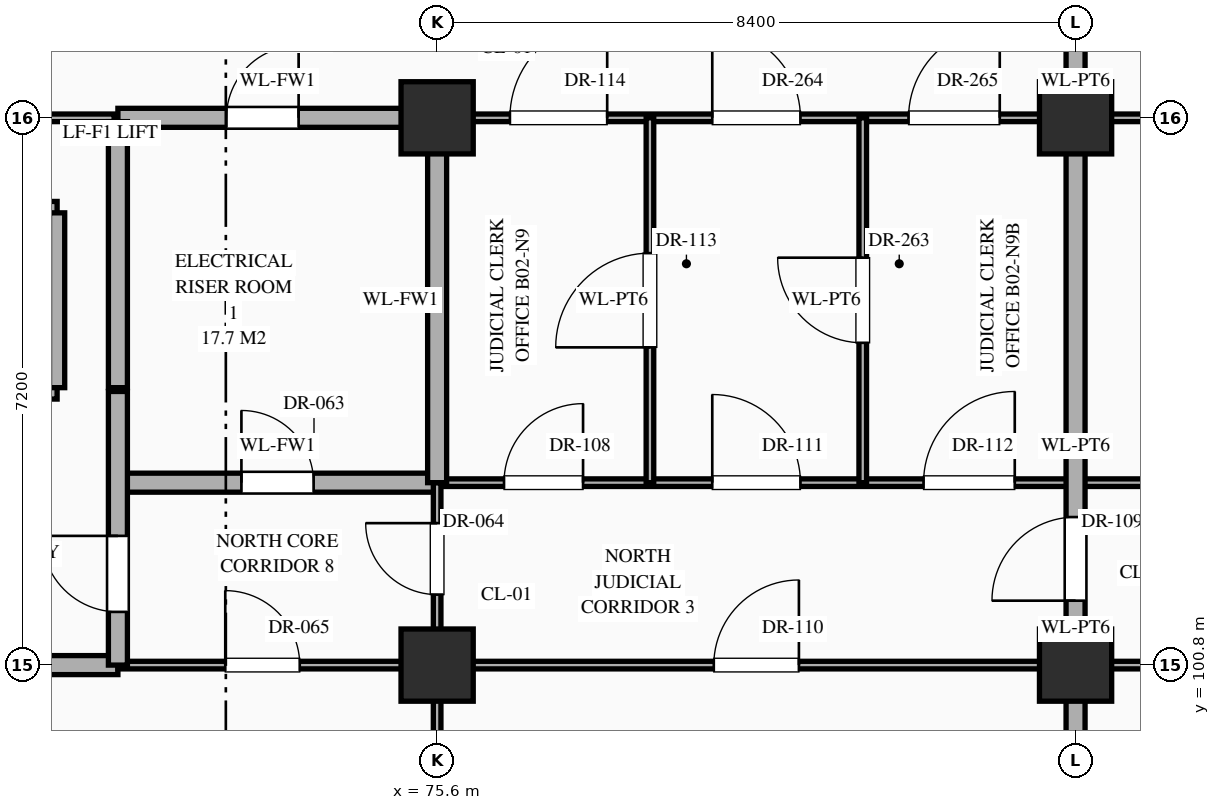
"""IFC4 building model, lengths in metres.
Left out: names, types, materials, properties, quantities, classifications, styles, units other than length and angle.
Written with IfcOpenShell. Run it as: python <this file> out.ifc"""

import sys

from ifc_helpers import new_model, si_unit, direction, frame, frame_2d, origin, origin_2d, place, context, subcontext, project, spatial, rectangle, extrude, element, fill, save


model = new_model("IFC4")
c1 = context("Model", 3, precision=1e-05, world=origin(), true_north=direction((0.0, 1.0)))
c2 = subcontext(c1, "Body", "Model", "MODEL_VIEW")
j1 = project(units=[si_unit("LENGTHUNIT", "METRE"), si_unit("PLANEANGLEUNIT", "RADIAN")], contexts=[c1])
p1 = place(None, origin())
s1 = spatial("IfcSite", under=j1, at=p1, CompositionType="ELEMENT")
p2 = place(p1, origin())
s2 = spatial("IfcBuilding", under=s1, at=p2, CompositionType="ELEMENT")
p3 = place(p2, frame((0.0, 0.0, -10.2)))
s3 = spatial("IfcBuildingStorey", under=s2, at=p3, CompositionType="ELEMENT", Elevation=-10.2)
for number, where, z_axis, x_axis in (
    (1, (75.6, 100.8, 0.0), (0.0, 0.0, 1.0), (1.0, 0.0, 0.0)),
    (2, (75.6, 108.0, 0.0), (0.0, 0.0, 1.0), (1.0, 0.0, 0.0)),
    (3, (84.0, 100.8, 0.0), (0.0, 0.0, 1.0), (1.0, 0.0, 0.0)),
    (4, (84.0, 108.0, 0.0), (0.0, 0.0, 1.0), (1.0, 0.0, 0.0)),
):
    element("IfcColumn", number, at=place(p3, frame(where, z_axis=z_axis, x_axis=x_axis)), inside=s3, PredefinedType="COLUMN", context=c2, shape_type="SweptSolid", body=[
        extrude(rectangle(XDim=0.95, YDim=0.95, at=origin_2d()), origin(), (0.0, 0.0, 1.0), 4.8),
    ])
p4 = place(p3, frame((58.8, 100.8, 0.0), z_axis=(0.0, 0.0, 1.0), x_axis=(1.0, 0.0, 0.0)))
e5 = element("IfcWall", 5, at=p4, inside=s3, PredefinedType="STANDARD", context=c2, shape_type="SweptSolid", body=[
    extrude(rectangle(XDim=12.6, YDim=0.25, at=frame_2d((6.3, 0.0))), origin(), (0.0, 0.0, 1.0), 3.63),
])
p5 = place(p4, frame((3.7, 0.0, 0.0)))
e6 = element("IfcOpeningElement", 6, at=p5, cuts=e5, PredefinedType="OPENING", context=c2, shape_type="SweptSolid", body=[
    extrude(rectangle(XDim=1.0, YDim=2.2, at=frame_2d((0.5, 1.1))), frame((0.0, 0.137, 0.0), z_axis=(0.0, -1.0, 0.0), x_axis=(1.0, 0.0, 0.0)), (0.0, 0.0, 1.0), 0.274),
])
p6 = place(p3, frame((71.4, 100.8, 0.0), z_axis=(0.0, 0.0, 1.0), x_axis=(1.0, 0.0, 0.0)))
e7 = element("IfcWall", 7, at=p6, inside=s3, PredefinedType="STANDARD", context=c2, shape_type="SweptSolid", body=[
    extrude(rectangle(XDim=25.2, YDim=0.1, at=frame_2d((12.6, 0.0))), origin(), (0.0, 0.0, 1.0), 3.63),
])
p7 = place(p6, frame((1.413, 0.0, 0.0)))
e8 = element("IfcOpeningElement", 8, at=p7, cuts=e7, PredefinedType="OPENING", context=c2, shape_type="SweptSolid", body=[
    extrude(rectangle(XDim=0.98, YDim=2.35, at=frame_2d((0.49, 1.175))), frame((0.0, 0.062, 0.0), z_axis=(0.0, -1.0, 0.0), x_axis=(1.0, 0.0, 0.0)), (0.0, 0.0, 1.0), 0.124),
])
p8 = place(p6, frame((22.867, 0.0, 0.0)))
e9 = element("IfcOpeningElement", 9, at=p8, cuts=e7, PredefinedType="OPENING", context=c2, shape_type="SweptSolid", body=[
    extrude(rectangle(XDim=0.86, YDim=2.1, at=frame_2d((0.43, 1.05))), frame((0.0, 0.062, 0.0), z_axis=(0.0, -1.0, 0.0), x_axis=(1.0, 0.0, 0.0)), (0.0, 0.0, 1.0), 0.124),
])
p9 = place(p6, frame((7.84, 0.0, 0.0)))
e10 = element("IfcOpeningElement", 10, at=p9, cuts=e7, PredefinedType="OPENING", context=c2, shape_type="SweptSolid", body=[
    extrude(rectangle(XDim=1.12, YDim=2.25, at=frame_2d((0.56, 1.125))), frame((0.0, 0.062, 0.0), z_axis=(0.0, -1.0, 0.0), x_axis=(1.0, 0.0, 0.0)), (0.0, 0.0, 1.0), 0.124),
])
p10 = place(p6, frame((14.008, 0.0, 0.0)))
e11 = element("IfcOpeningElement", 11, at=p10, cuts=e7, PredefinedType="OPENING", context=c2, shape_type="SweptSolid", body=[
    extrude(rectangle(XDim=0.98, YDim=2.35, at=frame_2d((0.49, 1.175))), frame((0.0, 0.062, 0.0), z_axis=(0.0, -1.0, 0.0), x_axis=(1.0, 0.0, 0.0)), (0.0, 0.0, 1.0), 0.124),
])
p11 = place(p6, frame((16.69, 0.0, 0.0)))
e12 = element("IfcOpeningElement", 12, at=p11, cuts=e7, PredefinedType="OPENING", context=c2, shape_type="SweptSolid", body=[
    extrude(rectangle(XDim=1.02, YDim=2.4, at=frame_2d((0.51, 1.2))), frame((0.0, 0.062, 0.0), z_axis=(0.0, -1.0, 0.0), x_axis=(1.0, 0.0, 0.0)), (0.0, 0.0, 1.0), 0.124),
])
p12 = place(p6, frame((18.972, 0.0, 0.0)))
e13 = element("IfcOpeningElement", 13, at=p12, cuts=e7, PredefinedType="OPENING", context=c2, shape_type="SweptSolid", body=[
    extrude(rectangle(XDim=1.06, YDim=2.4, at=frame_2d((0.53, 1.2))), frame((0.0, 0.062, 0.0), z_axis=(0.0, -1.0, 0.0), x_axis=(1.0, 0.0, 0.0)), (0.0, 0.0, 1.0), 0.124),
])
p13 = place(p3, frame((71.4, 103.2, 0.0), z_axis=(0.0, 0.0, 1.0), x_axis=(1.0, 0.0, 0.0)))
e14 = element("IfcWall", 14, at=p13, inside=s3, PredefinedType="STANDARD", context=c2, shape_type="SweptSolid", body=[
    extrude(rectangle(XDim=4.2, YDim=0.25, at=frame_2d((2.1, 0.0))), origin(), (0.0, 0.0, 1.0), 4.48),
])
p14 = place(p13, frame((1.625, 0.0, 0.0)))
e15 = element("IfcOpeningElement", 15, at=p14, cuts=e14, PredefinedType="OPENING", context=c2, shape_type="SweptSolid", body=[
    extrude(rectangle(XDim=0.95, YDim=2.15, at=frame_2d((0.475, 1.075))), frame((0.0, 0.137, 0.0), z_axis=(0.0, -1.0, 0.0), x_axis=(1.0, 0.0, 0.0)), (0.0, 0.0, 1.0), 0.274),
])
p15 = place(p3, frame((75.6, 103.2, 0.0), z_axis=(0.0, 0.0, 1.0), x_axis=(1.0, 0.0, 0.0)))
e16 = element("IfcWall", 16, at=p15, inside=s3, PredefinedType="STANDARD", context=c2, shape_type="SweptSolid", body=[
    extrude(rectangle(XDim=16.8, YDim=0.1, at=frame_2d((8.4, 0.0))), origin(), (0.0, 0.0, 1.0), 4.48),
])
p16 = place(p15, frame((0.88, 0.0, 0.0)))
e17 = element("IfcOpeningElement", 17, at=p16, cuts=e16, PredefinedType="OPENING", context=c2, shape_type="SweptSolid", body=[
    extrude(rectangle(XDim=1.04, YDim=2.2, at=frame_2d((0.52, 1.1))), frame((0.0, 0.062, 0.0), z_axis=(0.0, -1.0, 0.0), x_axis=(1.0, 0.0, 0.0)), (0.0, 0.0, 1.0), 0.124),
])
p17 = place(p15, frame((3.62, 0.0, 0.0)))
e18 = element("IfcOpeningElement", 18, at=p17, cuts=e16, PredefinedType="OPENING", context=c2, shape_type="SweptSolid", body=[
    extrude(rectangle(XDim=1.16, YDim=2.3, at=frame_2d((0.58, 1.15))), frame((0.0, 0.062, 0.0), z_axis=(0.0, -1.0, 0.0), x_axis=(1.0, 0.0, 0.0)), (0.0, 0.0, 1.0), 0.124),
])
p18 = place(p15, frame((6.4, 0.0, 0.0)))
e19 = element("IfcOpeningElement", 19, at=p18, cuts=e16, PredefinedType="OPENING", context=c2, shape_type="SweptSolid", body=[
    extrude(rectangle(XDim=1.2, YDim=2.35, at=frame_2d((0.6, 1.175))), frame((0.0, 0.062, 0.0), z_axis=(0.0, -1.0, 0.0), x_axis=(1.0, 0.0, 0.0)), (0.0, 0.0, 1.0), 0.124),
])
p19 = place(p15, frame((12.13, 0.0, 0.0)))
e20 = element("IfcOpeningElement", 20, at=p19, cuts=e16, PredefinedType="OPENING", context=c2, shape_type="SweptSolid", body=[
    extrude(rectangle(XDim=0.94, YDim=2.3, at=frame_2d((0.47, 1.15))), frame((0.0, 0.062, 0.0), z_axis=(0.0, -1.0, 0.0), x_axis=(1.0, 0.0, 0.0)), (0.0, 0.0, 1.0), 0.124),
])
p20 = place(p3, frame((67.6, 104.4, 0.0), z_axis=(0.0, 0.0, 1.0), x_axis=(1.0, 0.0, 0.0)))
e21 = element("IfcWall", 21, at=p20, inside=s3, PredefinedType="STANDARD", context=c2, shape_type="SweptSolid", body=[
    extrude(rectangle(XDim=3.0, YDim=0.2, at=frame_2d((1.5, 0.0))), origin(), (0.0, 0.0, 1.0), 4.48),
])
p21 = place(p20, frame((0.9, 0.0, 0.0)))
e22 = element("IfcOpeningElement", 22, at=p21, cuts=e21, PredefinedType="OPENING", context=c2, shape_type="SweptSolid", body=[
    extrude(rectangle(XDim=1.2, YDim=2.15, at=frame_2d((0.6, 1.075))), frame((0.0, 0.112, 0.0), z_axis=(0.0, -1.0, 0.0), x_axis=(1.0, 0.0, 0.0)), (0.0, 0.0, 1.0), 0.224),
])
p22 = place(p3, frame((67.6, 106.8, 0.0), z_axis=(0.0, 0.0, 1.0), x_axis=(1.0, 0.0, 0.0)))
e23 = element("IfcWall", 23, at=p22, inside=s3, PredefinedType="STANDARD", context=c2, shape_type="SweptSolid", body=[
    extrude(rectangle(XDim=3.0, YDim=0.2, at=frame_2d((1.5, 0.0))), origin(), (0.0, 0.0, 1.0), 4.48),
])
p23 = place(p3, frame((67.25, 108.0, 0.0), z_axis=(0.0, 0.0, 1.0), x_axis=(1.0, 0.0, 0.0)))
e24 = element("IfcWall", 24, at=p23, inside=s3, PredefinedType="STANDARD", context=c2, shape_type="SweptSolid", body=[
    extrude(rectangle(XDim=4.1, YDim=0.1, at=frame_2d((2.05, 0.0))), origin(), (0.0, 0.0, 1.0), 3.63),
])
p24 = place(p3, frame((71.4, 108.0, 0.0), z_axis=(0.0, 0.0, 1.0), x_axis=(1.0, 0.0, 0.0)))
e25 = element("IfcWall", 25, at=p24, inside=s3, PredefinedType="STANDARD", context=c2, shape_type="SweptSolid", body=[
    extrude(rectangle(XDim=4.2, YDim=0.25, at=frame_2d((2.1, 0.0))), origin(), (0.0, 0.0, 1.0), 3.63),
])
p25 = place(p24, frame((1.427, 0.0, 0.0)))
e26 = element("IfcOpeningElement", 26, at=p25, cuts=e25, PredefinedType="OPENING", context=c2, shape_type="SweptSolid", body=[
    extrude(rectangle(XDim=0.95, YDim=2.15, at=frame_2d((0.475, 1.075))), frame((0.0, 0.137, 0.0), z_axis=(0.0, -1.0, 0.0), x_axis=(1.0, 0.0, 0.0)), (0.0, 0.0, 1.0), 0.274),
])
p26 = place(p3, frame((75.6, 108.0, 0.0), z_axis=(0.0, 0.0, 1.0), x_axis=(1.0, 0.0, 0.0)))
e27 = element("IfcWall", 27, at=p26, inside=s3, PredefinedType="STANDARD", context=c2, shape_type="SweptSolid", body=[
    extrude(rectangle(XDim=16.8, YDim=0.1, at=frame_2d((8.4, 0.0))), origin(), (0.0, 0.0, 1.0), 3.63),
])
p27 = place(p26, frame((0.958, 0.0, 0.0)))
e28 = element("IfcOpeningElement", 28, at=p27, cuts=e27, PredefinedType="OPENING", context=c2, shape_type="SweptSolid", body=[
    extrude(rectangle(XDim=1.28, YDim=2.35, at=frame_2d((0.64, 1.175))), frame((0.0, 0.062, 0.0), z_axis=(0.0, -1.0, 0.0), x_axis=(1.0, 0.0, 0.0)), (0.0, 0.0, 1.0), 0.124),
])
p28 = place(p26, frame((12.03, 0.0, 0.0)))
e29 = element("IfcOpeningElement", 29, at=p28, cuts=e27, PredefinedType="OPENING", context=c2, shape_type="SweptSolid", body=[
    extrude(rectangle(XDim=1.14, YDim=2.4, at=frame_2d((0.57, 1.2))), frame((0.0, 0.062, 0.0), z_axis=(0.0, -1.0, 0.0), x_axis=(1.0, 0.0, 0.0)), (0.0, 0.0, 1.0), 0.124),
])
p29 = place(p26, frame((3.62, 0.0, 0.0)))
e30 = element("IfcOpeningElement", 30, at=p29, cuts=e27, PredefinedType="OPENING", context=c2, shape_type="SweptSolid", body=[
    extrude(rectangle(XDim=1.16, YDim=2.3, at=frame_2d((0.58, 1.15))), frame((0.0, 0.062, 0.0), z_axis=(0.0, -1.0, 0.0), x_axis=(1.0, 0.0, 0.0)), (0.0, 0.0, 1.0), 0.124),
])
p30 = place(p26, frame((6.202, 0.0, 0.0)))
e31 = element("IfcOpeningElement", 31, at=p30, cuts=e27, PredefinedType="OPENING", context=c2, shape_type="SweptSolid", body=[
    extrude(rectangle(XDim=1.2, YDim=2.35, at=frame_2d((0.6, 1.175))), frame((0.0, 0.062, 0.0), z_axis=(0.0, -1.0, 0.0), x_axis=(1.0, 0.0, 0.0)), (0.0, 0.0, 1.0), 0.124),
])
p31 = place(p3, frame((70.6, 104.45, 0.0), z_axis=(0.0, 0.0, 1.0), x_axis=(0.0, 1.0, 0.0)))
e32 = element("IfcWall", 32, at=p31, inside=s3, PredefinedType="STANDARD", context=c2, shape_type="SweptSolid", body=[
    extrude(rectangle(XDim=2.3, YDim=0.2, at=frame_2d((1.15, 0.0))), origin(), (0.0, 0.0, 1.0), 4.48),
])
p32 = place(p3, frame((71.4, 100.8, 0.0), z_axis=(0.0, 0.0, 1.0), x_axis=(0.0, 1.0, 0.0)))
e33 = element("IfcWall", 33, at=p32, inside=s3, PredefinedType="STANDARD", context=c2, shape_type="SweptSolid", body=[
    extrude(rectangle(XDim=3.6, YDim=0.25, at=frame_2d((1.8, 0.0))), origin(), (0.0, 0.0, 1.0), 4.48),
])
p33 = place(p32, frame((0.7, 0.0, 0.0)))
e34 = element("IfcOpeningElement", 34, at=p33, cuts=e33, PredefinedType="OPENING", context=c2, shape_type="SweptSolid", body=[
    extrude(rectangle(XDim=1.0, YDim=2.2, at=frame_2d((0.5, 1.1))), frame((0.0, 0.137, 0.0), z_axis=(0.0, -1.0, 0.0), x_axis=(1.0, 0.0, 0.0)), (0.0, 0.0, 1.0), 0.274),
])
p34 = place(p3, frame((71.4, 104.45, 0.0), z_axis=(0.0, 0.0, 1.0), x_axis=(0.0, 1.0, 0.0)))
e35 = element("IfcWall", 35, at=p34, inside=s3, PredefinedType="STANDARD", context=c2, shape_type="SweptSolid", body=[
    extrude(rectangle(XDim=3.5, YDim=0.25, at=frame_2d((1.75, 0.0))), origin(), (0.0, 0.0, 1.0), 4.48),
])
p35 = place(p3, frame((75.6, 96.0, 0.0), z_axis=(0.0, 0.0, 1.0), x_axis=(0.0, 1.0, 0.0)))
e36 = element("IfcWall", 36, at=p35, inside=s3, PredefinedType="STANDARD", context=c2, shape_type="SweptSolid", body=[
    extrude(rectangle(XDim=7.2, YDim=0.1, at=frame_2d((3.6, 0.0))), origin(), (0.0, 0.0, 1.0), 3.73),
])
p36 = place(p35, frame((5.728, 0.0, 0.0)))
e37 = element("IfcOpeningElement", 37, at=p36, cuts=e36, PredefinedType="OPENING", context=c2, shape_type="SweptSolid", body=[
    extrude(rectangle(XDim=0.94, YDim=2.3, at=frame_2d((0.47, 1.15))), frame((0.0, 0.062, 0.0), z_axis=(0.0, -1.0, 0.0), x_axis=(1.0, 0.0, 0.0)), (0.0, 0.0, 1.0), 0.124),
])
p37 = place(p3, frame((75.6, 103.2, 0.0), z_axis=(0.0, 0.0, 1.0), x_axis=(0.0, 1.0, 0.0)))
e38 = element("IfcWall", 38, at=p37, inside=s3, PredefinedType="STANDARD", context=c2, shape_type="SweptSolid", body=[
    extrude(rectangle(XDim=4.8, YDim=0.25, at=frame_2d((2.4, 0.0))), origin(), (0.0, 0.0, 1.0), 3.73),
])
p38 = place(p3, frame((78.4, 103.2, 0.0), z_axis=(0.0, 0.0, 1.0), x_axis=(0.0, 1.0, 0.0)))
e39 = element("IfcWall", 39, at=p38, inside=s3, PredefinedType="STANDARD", context=c2, shape_type="SweptSolid", body=[
    extrude(rectangle(XDim=4.8, YDim=0.1, at=frame_2d((2.4, 0.0))), origin(), (0.0, 0.0, 1.0), 4.48),
])
p39 = place(p38, frame((1.78, 0.0, 0.0)))
e40 = element("IfcOpeningElement", 40, at=p39, cuts=e39, PredefinedType="OPENING", context=c2, shape_type="SweptSolid", body=[
    extrude(rectangle(XDim=1.24, YDim=2.3, at=frame_2d((0.62, 1.15))), frame((0.0, 0.062, 0.0), z_axis=(0.0, -1.0, 0.0), x_axis=(1.0, 0.0, 0.0)), (0.0, 0.0, 1.0), 0.124),
])
p40 = place(p3, frame((81.2, 103.2, 0.0), z_axis=(0.0, 0.0, 1.0), x_axis=(0.0, 1.0, 0.0)))
e41 = element("IfcWall", 41, at=p40, inside=s3, PredefinedType="STANDARD", context=c2, shape_type="SweptSolid", body=[
    extrude(rectangle(XDim=4.8, YDim=0.1, at=frame_2d((2.4, 0.0))), origin(), (0.0, 0.0, 1.0), 4.48),
])
p41 = place(p40, frame((1.84, 0.0, 0.0)))
e42 = element("IfcOpeningElement", 42, at=p41, cuts=e41, PredefinedType="OPENING", context=c2, shape_type="SweptSolid", body=[
    extrude(rectangle(XDim=1.12, YDim=2.25, at=frame_2d((0.56, 1.125))), frame((0.0, 0.062, 0.0), z_axis=(0.0, -1.0, 0.0), x_axis=(1.0, 0.0, 0.0)), (0.0, 0.0, 1.0), 0.124),
])
p42 = place(p3, frame((84.0, 79.2, 0.0), z_axis=(0.0, 0.0, 1.0), x_axis=(0.0, 1.0, 0.0)))
e43 = element("IfcWall", 43, at=p42, inside=s3, PredefinedType="STANDARD", context=c2, shape_type="SweptSolid", body=[
    extrude(rectangle(XDim=35.96, YDim=0.25, at=frame_2d((17.98, 0.0))), origin(), (0.0, 0.0, 1.0), 3.73),
])
p43 = place(p42, frame((22.448, 0.0, 0.0)))
e44 = element("IfcOpeningElement", 44, at=p43, cuts=e43, PredefinedType="OPENING", context=c2, shape_type="SweptSolid", body=[
    extrude(rectangle(XDim=1.1, YDim=2.2, at=frame_2d((0.55, 1.1))), frame((0.0, 0.137, 0.0), z_axis=(0.0, -1.0, 0.0), x_axis=(1.0, 0.0, 0.0)), (0.0, 0.0, 1.0), 0.274),
])
p44 = place(p42, frame((12.502, 0.0, 0.0)))
e45 = element("IfcOpeningElement", 45, at=p44, cuts=e43, PredefinedType="OPENING", context=c2, shape_type="SweptSolid", body=[
    extrude(rectangle(XDim=1.0, YDim=2.2, at=frame_2d((0.5, 1.1))), frame((0.0, 0.137, 0.0), z_axis=(0.0, -1.0, 0.0), x_axis=(1.0, 0.0, 0.0)), (0.0, 0.0, 1.0), 0.274),
])
p45 = place(p42, frame((15.248, 0.0, 0.0)))
e46 = element("IfcOpeningElement", 46, at=p45, cuts=e43, PredefinedType="OPENING", context=c2, shape_type="SweptSolid", body=[
    extrude(rectangle(XDim=1.1, YDim=2.2, at=frame_2d((0.55, 1.1))), frame((0.0, 0.137, 0.0), z_axis=(0.0, -1.0, 0.0), x_axis=(1.0, 0.0, 0.0)), (0.0, 0.0, 1.0), 0.274),
])
p46 = place(p42, frame((29.722, 0.0, 0.0)))
e47 = element("IfcOpeningElement", 47, at=p46, cuts=e43, PredefinedType="OPENING", context=c2, shape_type="SweptSolid", body=[
    extrude(rectangle(XDim=0.95, YDim=2.15, at=frame_2d((0.475, 1.075))), frame((0.0, 0.137, 0.0), z_axis=(0.0, -1.0, 0.0), x_axis=(1.0, 0.0, 0.0)), (0.0, 0.0, 1.0), 0.274),
])
p47 = place(p42, frame((5.302, 0.0, 0.0)))
e48 = element("IfcOpeningElement", 48, at=p47, cuts=e43, PredefinedType="OPENING", context=c2, shape_type="SweptSolid", body=[
    extrude(rectangle(XDim=1.0, YDim=2.2, at=frame_2d((0.5, 1.1))), frame((0.0, 0.137, 0.0), z_axis=(0.0, -1.0, 0.0), x_axis=(1.0, 0.0, 0.0)), (0.0, 0.0, 1.0), 0.274),
])
p48 = place(p33, origin())
e49 = element("IfcDoor", 49, at=p48, inside=s3, OperationType="SINGLE_SWING_RIGHT", PredefinedType="DOOR", context=c2, shape_type="SweptSolid", body=[
    extrude(rectangle(XDim=1.0, YDim=2.2, at=frame_2d((0.5, 1.1))), frame((0.0, 0.025, 0.0), z_axis=(0.0, -1.0, 0.0), x_axis=(1.0, 0.0, 0.0)), (0.0, 0.0, 1.0), 0.05),
])
fill(e34, e49)
p49 = place(p14, origin())
e50 = element("IfcDoor", 50, at=p49, inside=s3, OperationType="SINGLE_SWING_LEFT", PredefinedType="DOOR", context=c2, shape_type="SweptSolid", body=[
    extrude(rectangle(XDim=0.95, YDim=2.15, at=frame_2d((0.475, 1.075))), frame((0.0, 0.025, 0.0), z_axis=(0.0, -1.0, 0.0), x_axis=(1.0, 0.0, 0.0)), (0.0, 0.0, 1.0), 0.05),
])
fill(e15, e50)
p50 = place(p36, origin())
e51 = element("IfcDoor", 51, at=p50, inside=s3, OperationType="SINGLE_SWING_RIGHT", PredefinedType="DOOR", context=c2, shape_type="SweptSolid", body=[
    extrude(rectangle(XDim=0.94, YDim=2.3, at=frame_2d((0.47, 1.15))), frame((0.0, 0.025, 0.0), z_axis=(0.0, -1.0, 0.0), x_axis=(1.0, 0.0, 0.0)), (0.0, 0.0, 1.0), 0.05),
])
fill(e37, e51)
p51 = place(p7, origin())
e52 = element("IfcDoor", 52, at=p51, inside=s3, OperationType="SINGLE_SWING_LEFT", PredefinedType="DOOR", context=c2, shape_type="SweptSolid", body=[
    extrude(rectangle(XDim=0.98, YDim=2.35, at=frame_2d((0.49, 1.175))), frame((0.0, 0.025, 0.0), z_axis=(0.0, -1.0, 0.0), x_axis=(1.0, 0.0, 0.0)), (0.0, 0.0, 1.0), 0.05),
])
fill(e8, e52)
p52 = place(p25, origin())
e53 = element("IfcDoor", 53, at=p52, inside=s3, OperationType="SINGLE_SWING_RIGHT", PredefinedType="DOOR", context=c2, shape_type="SweptSolid", body=[
    extrude(rectangle(XDim=0.95, YDim=2.15, at=frame_2d((0.475, 1.075))), frame((0.0, 0.025, 0.0), z_axis=(0.0, -1.0, 0.0), x_axis=(1.0, 0.0, 0.0)), (0.0, 0.0, 1.0), 0.05),
])
fill(e26, e53)
p53 = place(p16, origin())
e54 = element("IfcDoor", 54, at=p53, inside=s3, OperationType="SINGLE_SWING_RIGHT", PredefinedType="DOOR", context=c2, shape_type="SweptSolid", body=[
    extrude(rectangle(XDim=1.04, YDim=2.2, at=frame_2d((0.52, 1.1))), frame((0.0, 0.025, 0.0), z_axis=(0.0, -1.0, 0.0), x_axis=(1.0, 0.0, 0.0)), (0.0, 0.0, 1.0), 0.05),
])
fill(e17, e54)
p54 = place(p43, origin())
e55 = element("IfcDoor", 55, at=p54, inside=s3, OperationType="SINGLE_SWING_LEFT", PredefinedType="DOOR", context=c2, shape_type="SweptSolid", body=[
    extrude(rectangle(XDim=1.1, YDim=2.2, at=frame_2d((0.55, 1.1))), frame((0.0, 0.025, 0.0), z_axis=(0.0, -1.0, 0.0), x_axis=(1.0, 0.0, 0.0)), (0.0, 0.0, 1.0), 0.05),
])
fill(e44, e55)
p55 = place(p9, origin())
e56 = element("IfcDoor", 56, at=p55, inside=s3, OperationType="SINGLE_SWING_RIGHT", PredefinedType="DOOR", context=c2, shape_type="SweptSolid", body=[
    extrude(rectangle(XDim=1.12, YDim=2.25, at=frame_2d((0.56, 1.125))), frame((0.0, 0.025, 0.0), z_axis=(0.0, -1.0, 0.0), x_axis=(1.0, 0.0, 0.0)), (0.0, 0.0, 1.0), 0.05),
])
fill(e10, e56)
p56 = place(p17, origin())
e57 = element("IfcDoor", 57, at=p56, inside=s3, OperationType="SINGLE_SWING_LEFT", PredefinedType="DOOR", context=c2, shape_type="SweptSolid", body=[
    extrude(rectangle(XDim=1.16, YDim=2.3, at=frame_2d((0.58, 1.15))), frame((0.0, 0.025, 0.0), z_axis=(0.0, -1.0, 0.0), x_axis=(1.0, 0.0, 0.0)), (0.0, 0.0, 1.0), 0.05),
])
fill(e18, e57)
p57 = place(p18, origin())
e58 = element("IfcDoor", 58, at=p57, inside=s3, OperationType="SINGLE_SWING_RIGHT", PredefinedType="DOOR", context=c2, shape_type="SweptSolid", body=[
    extrude(rectangle(XDim=1.2, YDim=2.35, at=frame_2d((0.6, 1.175))), frame((0.0, 0.025, 0.0), z_axis=(0.0, -1.0, 0.0), x_axis=(1.0, 0.0, 0.0)), (0.0, 0.0, 1.0), 0.05),
])
fill(e19, e58)
p58 = place(p39, origin())
e59 = element("IfcDoor", 59, at=p58, inside=s3, OperationType="SINGLE_SWING_LEFT", PredefinedType="DOOR", context=c2, shape_type="SweptSolid", body=[
    extrude(rectangle(XDim=1.24, YDim=2.3, at=frame_2d((0.62, 1.15))), frame((0.0, 0.025, 0.0), z_axis=(0.0, -1.0, 0.0), x_axis=(1.0, 0.0, 0.0)), (0.0, 0.0, 1.0), 0.05),
])
fill(e40, e59)
p59 = place(p27, origin())
e60 = element("IfcDoor", 60, at=p59, inside=s3, OperationType="SINGLE_SWING_RIGHT", PredefinedType="DOOR", context=c2, shape_type="SweptSolid", body=[
    extrude(rectangle(XDim=1.28, YDim=2.35, at=frame_2d((0.64, 1.175))), frame((0.0, 0.025, 0.0), z_axis=(0.0, -1.0, 0.0), x_axis=(1.0, 0.0, 0.0)), (0.0, 0.0, 1.0), 0.05),
])
fill(e28, e60)
p60 = place(p41, origin())
e61 = element("IfcDoor", 61, at=p60, inside=s3, OperationType="SINGLE_SWING_RIGHT", PredefinedType="DOOR", context=c2, shape_type="SweptSolid", body=[
    extrude(rectangle(XDim=1.12, YDim=2.25, at=frame_2d((0.56, 1.125))), frame((0.0, 0.025, 0.0), z_axis=(0.0, -1.0, 0.0), x_axis=(1.0, 0.0, 0.0)), (0.0, 0.0, 1.0), 0.05),
])
fill(e42, e61)
p61 = place(p29, origin())
e62 = element("IfcDoor", 62, at=p61, inside=s3, OperationType="SINGLE_SWING_LEFT", PredefinedType="DOOR", context=c2, shape_type="SweptSolid", body=[
    extrude(rectangle(XDim=1.16, YDim=2.3, at=frame_2d((0.58, 1.15))), frame((0.0, 0.025, 0.0), z_axis=(0.0, -1.0, 0.0), x_axis=(1.0, 0.0, 0.0)), (0.0, 0.0, 1.0), 0.05),
])
fill(e30, e62)
p62 = place(p30, origin())
e63 = element("IfcDoor", 63, at=p62, inside=s3, OperationType="SINGLE_SWING_RIGHT", PredefinedType="DOOR", context=c2, shape_type="SweptSolid", body=[
    extrude(rectangle(XDim=1.2, YDim=2.35, at=frame_2d((0.6, 1.175))), frame((0.0, 0.025, 0.0), z_axis=(0.0, -1.0, 0.0), x_axis=(1.0, 0.0, 0.0)), (0.0, 0.0, 1.0), 0.05),
])
fill(e31, e63)
save(model, sys.argv[1])
